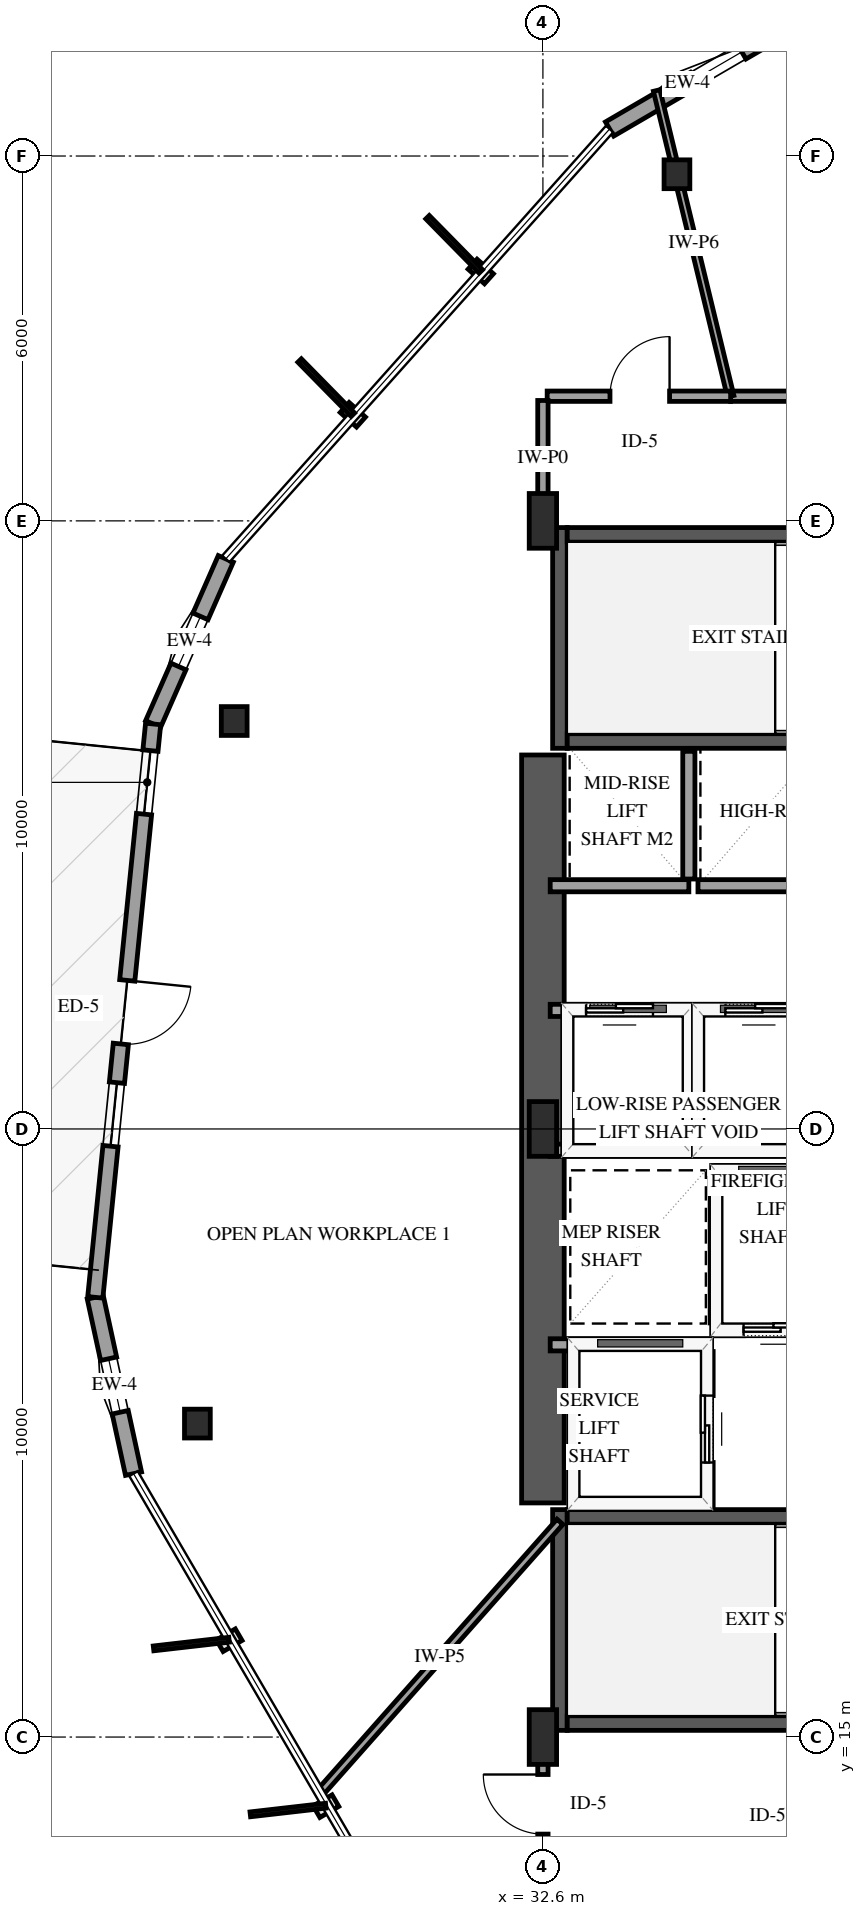
"""IFC4 building model, lengths in metres.
Left out: names, types, materials, properties, quantities, classifications, styles, units other than length and angle.
Written with IfcOpenShell. Run it as: python <this file> out.ifc"""

import sys

from ifc_helpers import new_model, si_unit, direction, frame, frame_2d, origin, origin_2d, place, context, subcontext, project, spatial, rectangle, i_section, extrude, element, fill, save


model = new_model("IFC4")
c1 = context("Model", 3, precision=1e-05, world=origin(), true_north=direction((0.0, 1.0)))
c2 = subcontext(c1, "Body", "Model", "MODEL_VIEW")
j1 = project(units=[si_unit("LENGTHUNIT", "METRE"), si_unit("PLANEANGLEUNIT", "RADIAN")], contexts=[c1])
p1 = place(None, origin())
s1 = spatial("IfcSite", under=j1, at=p1, CompositionType="ELEMENT")
p2 = place(p1, origin())
s2 = spatial("IfcBuilding", under=s1, at=p2, CompositionType="ELEMENT")
p3 = place(p2, frame((0.0, 0.0, 74.6)))
s3 = spatial("IfcBuildingStorey", under=s2, at=p3, CompositionType="ELEMENT", Elevation=74.6)
p4 = place(p3, frame((32.88, 15.11, 0.0), z_axis=(0.0, 0.0, 1.0), x_axis=(0.0, 1.0, 0.0)))
e1 = element("IfcWall", 1, at=p4, inside=s3, PredefinedType="SHEAR", context=c2, shape_type="SweptSolid", body=[
    extrude(rectangle(XDim=3.63, YDim=0.24, at=frame_2d((1.815, 0.0))), origin(), (0.0, 0.0, 1.0), 4.0),
])
for number, where, z_axis, x_axis in (
    (2, (33.0, 15.23, 0.0), (0.0, 0.0, 1.0), (1.0, 0.0, 0.0)),
    (3, (33.0, 18.62, 0.0), (0.0, 0.0, 1.0), (1.0, 0.0, 0.0)),
):
    element("IfcWall", number, at=place(p3, frame(where, z_axis=z_axis, x_axis=x_axis)), inside=s3, PredefinedType="SHEAR", context=c2, shape_type="SweptSolid", body=[
        extrude(rectangle(XDim=8.0, YDim=0.24, at=frame_2d((4.0, 0.0))), origin(), (0.0, 0.0, 1.0), 4.0),
    ])
p5 = place(p3, frame((32.88, 31.26, 0.0), z_axis=(0.0, 0.0, 1.0), x_axis=(0.0, 1.0, 0.0)))
e4 = element("IfcWall", 4, at=p5, inside=s3, PredefinedType="SHEAR", context=c2, shape_type="SweptSolid", body=[
    extrude(rectangle(XDim=3.63, YDim=0.24, at=frame_2d((1.815, 0.0))), origin(), (0.0, 0.0, 1.0), 4.0),
])
for number, where, z_axis, x_axis in (
    (5, (33.0, 31.38, 0.0), (0.0, 0.0, 1.0), (1.0, 0.0, 0.0)),
    (6, (33.0, 34.77, 0.0), (0.0, 0.0, 1.0), (1.0, 0.0, 0.0)),
):
    element("IfcWall", number, at=place(p3, frame(where, z_axis=z_axis, x_axis=x_axis)), inside=s3, PredefinedType="SHEAR", context=c2, shape_type="SweptSolid", body=[
        extrude(rectangle(XDim=8.0, YDim=0.24, at=frame_2d((4.0, 0.0))), origin(), (0.0, 0.0, 1.0), 4.0),
    ])
p6 = place(p3, frame((32.6, 18.85, 0.0), z_axis=(0.0, 0.0, 1.0), x_axis=(0.0, 1.0, 0.0)))
e7 = element("IfcWall", 7, at=p6, inside=s3, PredefinedType="SHEAR", context=c2, shape_type="SweptSolid", body=[
    extrude(rectangle(XDim=12.3, YDim=0.7, at=frame_2d((6.15, 0.0))), origin(), (0.0, 0.0, 1.0), 4.0),
])
for number, where, z_axis, x_axis in (
    (8, (32.6, 15.0, 0.0), (0.0, 0.0, 1.0), (1.0, 0.0, 0.0)),
    (9, (32.6, 25.0, 0.0), (0.0, 0.0, 1.0), (1.0, 0.0, 0.0)),
    (10, (32.6, 35.0, 0.0), (0.0, 0.0, 1.0), (1.0, 0.0, 0.0)),
):
    element("IfcColumn", number, at=place(p3, frame(where, z_axis=z_axis, x_axis=x_axis)), inside=s3, PredefinedType="PILASTER", context=c2, shape_type="SweptSolid", body=[
        extrude(rectangle(XDim=0.45, YDim=0.9, at=origin_2d()), origin(), (0.0, 0.0, 1.0), 4.0),
    ])
for number, where, z_axis, x_axis in (
    (11, (34.804, 40.7, 0.0), (0.0, 0.0, 1.0), (1.0, 0.0, 0.0)),
    (12, (27.523, 31.708, 0.0), (0.0, 0.0, 1.0), (1.0, 0.0, 0.0)),
    (13, (26.918, 20.155, 0.0), (0.0, 0.0, 1.0), (1.0, 0.0, 0.0)),
):
    element("IfcColumn", number, at=place(p3, frame(where, z_axis=z_axis, x_axis=x_axis)), inside=s3, PredefinedType="COLUMN", context=c2, shape_type="SweptSolid", body=[
        extrude(i_section(OverallWidth=0.424, OverallDepth=0.474, WebThickness=0.048, FlangeThickness=0.077, FilletRadius=0.038, at=origin_2d()), origin(), (0.0, 0.0, 1.0), 4.0),
    ])
p7 = place(p3, frame((36.26, 42.938, 0.0), z_axis=(0.0, 0.0, 1.0), x_axis=(-0.863895290782, -0.503671447041, 0.0)))
e14 = element("IfcWall", 14, at=p7, inside=s3, PredefinedType="SOLIDWALL", context=c2, shape_type="SweptSolid", body=[
    extrude(rectangle(XDim=2.967, YDim=0.27, at=frame_2d((1.483, 0.0))), origin(), (0.0, 0.0, 1.0), 3.079),
])
p8 = place(p7, frame((0.45, 0.0, 0.75)))
e15 = element("IfcOpeningElement", 15, at=p8, cuts=e14, PredefinedType="OPENING", context=c2, shape_type="SweptSolid", body=[
    extrude(rectangle(XDim=0.9, YDim=1.5, at=frame_2d((0.45, 0.75))), frame((0.0, 0.145, 0.0), z_axis=(0.0, -1.0, 0.0), x_axis=(1.0, 0.0, 0.0)), (0.0, 0.0, 1.0), 0.29),
])
p9 = place(p3, frame((27.385, 34.375, 0.0), z_axis=(0.0, 0.0, 1.0), x_axis=(-0.402859965055, -0.915261628473, 0.0)))
e16 = element("IfcWall", 16, at=p9, inside=s3, PredefinedType="SOLIDWALL", context=c2, shape_type="SweptSolid", body=[
    extrude(rectangle(XDim=2.967, YDim=0.27, at=frame_2d((1.483, 0.0))), origin(), (0.0, 0.0, 1.0), 3.079),
])
p10 = place(p9, frame((1.033, 0.0, 0.75)))
e17 = element("IfcOpeningElement", 17, at=p10, cuts=e16, PredefinedType="OPENING", context=c2, shape_type="SweptSolid", body=[
    extrude(rectangle(XDim=0.9, YDim=1.5, at=frame_2d((0.45, 0.75))), frame((0.0, 0.145, 0.0), z_axis=(0.0, -1.0, 0.0), x_axis=(1.0, 0.0, 0.0)), (0.0, 0.0, 1.0), 0.29),
])
p11 = place(p3, frame((25.239, 22.231, 0.0), z_axis=(0.0, 0.0, 1.0), x_axis=(0.212012761333, -0.977266897542, 0.0)))
e18 = element("IfcWall", 18, at=p11, inside=s3, PredefinedType="SOLIDWALL", context=c2, shape_type="SweptSolid", body=[
    extrude(rectangle(XDim=2.966, YDim=0.27, at=frame_2d((1.483, 0.0))), origin(), (0.0, 0.0, 1.0), 3.079),
])
p12 = place(p11, frame((1.033, 0.0, 0.75)))
e19 = element("IfcOpeningElement", 19, at=p12, cuts=e18, PredefinedType="OPENING", context=c2, shape_type="SweptSolid", body=[
    extrude(rectangle(XDim=0.9, YDim=1.5, at=frame_2d((0.45, 0.75))), frame((0.0, 0.145, 0.0), z_axis=(0.0, -1.0, 0.0), x_axis=(1.0, 0.0, 0.0)), (0.0, 0.0, 1.0), 0.29),
])
p13 = place(p3, frame((26.19, 31.66, 0.0), z_axis=(0.0, 0.0, 1.0), x_axis=(-0.100365790493, -0.994950605859, 0.0)))
e20 = element("IfcWall", 20, at=p13, inside=s3, PredefinedType="SOLIDWALL", context=c2, shape_type="SweptSolid", body=[
    extrude(rectangle(XDim=9.477, YDim=0.25, at=frame_2d((4.739, 0.0))), origin(), (0.0, 0.0, 1.0), 3.079),
])
p14 = place(p13, frame((4.239, 0.0, 0.0)))
e21 = element("IfcOpeningElement", 21, at=p14, cuts=e20, PredefinedType="OPENING", context=c2, shape_type="SweptSolid", body=[
    extrude(rectangle(XDim=1.05, YDim=2.15, at=frame_2d((0.525, 1.075))), frame((0.0, 0.135, 0.0), z_axis=(0.0, -1.0, 0.0), x_axis=(1.0, 0.0, 0.0)), (0.0, 0.0, 1.0), 0.27),
])
p15 = place(p13, frame((0.44, 0.0, 0.72)))
e22 = element("IfcOpeningElement", 22, at=p15, cuts=e20, PredefinedType="OPENING", context=c2, shape_type="SweptSolid", body=[
    extrude(rectangle(XDim=1.05, YDim=1.55, at=frame_2d((0.525, 0.775))), frame((0.0, 0.135, 0.0), z_axis=(0.0, -1.0, 0.0), x_axis=(1.0, 0.0, 0.0)), (0.0, 0.0, 1.0), 0.27),
])
p16 = place(p13, frame((5.928, 0.0, 0.72)))
e23 = element("IfcOpeningElement", 23, at=p16, cuts=e20, PredefinedType="OPENING", context=c2, shape_type="SweptSolid", body=[
    extrude(rectangle(XDim=1.05, YDim=1.55, at=frame_2d((0.525, 0.775))), frame((0.0, 0.135, 0.0), z_axis=(0.0, -1.0, 0.0), x_axis=(1.0, 0.0, 0.0)), (0.0, 0.0, 1.0), 0.27),
])
p17 = place(p3, frame((35.45, 21.7, 0.0), z_axis=(0.0, 0.0, 1.0), x_axis=(1.0, 0.0, 0.0)))
e24 = element("IfcWall", 24, at=p17, inside=s3, PredefinedType="SOLIDWALL", context=c2, shape_type="SweptSolid", body=[
    extrude(rectangle(XDim=2.0, YDim=0.2, at=frame_2d((1.0, 0.0))), origin(), (0.0, 0.0, 1.0), 3.7),
])
p18 = place(p17, frame((0.45, 0.0, 0.0)))
e25 = element("IfcOpeningElement", 25, at=p18, cuts=e24, PredefinedType="OPENING", context=c2, shape_type="SweptSolid", body=[
    extrude(rectangle(XDim=1.1, YDim=2.15, at=frame_2d((0.55, 1.075))), frame((0.0, 0.11, 0.0), z_axis=(0.0, -1.0, 0.0), x_axis=(1.0, 0.0, 0.0)), (0.0, 0.0, 1.0), 0.22),
])
p19 = place(p3, frame((35.45, 24.3, 0.0), z_axis=(0.0, 0.0, 1.0), x_axis=(1.0, 0.0, 0.0)))
e26 = element("IfcWall", 26, at=p19, inside=s3, PredefinedType="SOLIDWALL", context=c2, shape_type="SweptSolid", body=[
    extrude(rectangle(XDim=2.0, YDim=0.2, at=frame_2d((1.0, 0.0))), origin(), (0.0, 0.0, 1.0), 3.7),
])
p20 = place(p3, frame((35.45, 21.81, 0.0), z_axis=(0.0, 0.0, 1.0), x_axis=(0.0, 1.0, 0.0)))
e27 = element("IfcWall", 27, at=p20, inside=s3, PredefinedType="SOLIDWALL", context=c2, shape_type="SweptSolid", body=[
    extrude(rectangle(XDim=2.38, YDim=0.2, at=frame_2d((1.19, 0.0))), origin(), (0.0, 0.0, 1.0), 3.7),
])
p21 = place(p3, frame((32.72, 21.45, 0.0), z_axis=(0.0, 0.0, 1.0), x_axis=(1.0, 0.0, 0.0)))
e28 = element("IfcWall", 28, at=p21, inside=s3, PredefinedType="SOLIDWALL", context=c2, shape_type="SweptSolid", body=[
    extrude(rectangle(XDim=2.58, YDim=0.2, at=frame_2d((1.29, 0.0))), origin(), (0.0, 0.0, 1.0), 3.7),
])
p22 = place(p3, frame((35.3, 18.79, 0.0), z_axis=(0.0, 0.0, 1.0), x_axis=(0.0, 1.0, 0.0)))
e29 = element("IfcWall", 29, at=p22, inside=s3, PredefinedType="SOLIDWALL", context=c2, shape_type="SweptSolid", body=[
    extrude(rectangle(XDim=2.55, YDim=0.2, at=frame_2d((1.275, 0.0))), origin(), (0.0, 0.0, 1.0), 3.7),
])
p23 = place(p22, frame((0.725, 0.0, 0.0)))
e30 = element("IfcOpeningElement", 30, at=p23, cuts=e29, PredefinedType="OPENING", context=c2, shape_type="SweptSolid", body=[
    extrude(rectangle(XDim=1.1, YDim=2.15, at=frame_2d((0.55, 1.075))), frame((0.0, 0.11, 0.0), z_axis=(0.0, -1.0, 0.0), x_axis=(1.0, 0.0, 0.0)), (0.0, 0.0, 1.0), 0.22),
])
p24 = place(p3, frame((32.72, 24.65, 0.0), z_axis=(0.0, 0.0, 1.0), x_axis=(1.0, 0.0, 0.0)))
e31 = element("IfcWall", 31, at=p24, inside=s3, PredefinedType="SOLIDWALL", context=c2, shape_type="SweptSolid", body=[
    extrude(rectangle(XDim=2.28, YDim=0.2, at=frame_2d((1.14, 0.0))), origin(), (0.0, 0.0, 1.0), 3.7),
])
p25 = place(p3, frame((32.72, 26.95, 0.0), z_axis=(0.0, 0.0, 1.0), x_axis=(1.0, 0.0, 0.0)))
e32 = element("IfcWall", 32, at=p25, inside=s3, PredefinedType="SOLIDWALL", context=c2, shape_type="SweptSolid", body=[
    extrude(rectangle(XDim=2.28, YDim=0.2, at=frame_2d((1.14, 0.0))), origin(), (0.0, 0.0, 1.0), 3.7),
])
p26 = place(p25, frame((0.59, 0.0, 0.0)))
e33 = element("IfcOpeningElement", 33, at=p26, cuts=e32, PredefinedType="OPENING", context=c2, shape_type="SweptSolid", body=[
    extrude(rectangle(XDim=1.1, YDim=2.15, at=frame_2d((0.55, 1.075))), frame((0.0, 0.11, 0.0), z_axis=(0.0, -1.0, 0.0), x_axis=(1.0, 0.0, 0.0)), (0.0, 0.0, 1.0), 0.22),
])
p27 = place(p3, frame((35.0, 24.76, 0.0), z_axis=(0.0, 0.0, 1.0), x_axis=(0.0, 1.0, 0.0)))
e34 = element("IfcWall", 34, at=p27, inside=s3, PredefinedType="SOLIDWALL", context=c2, shape_type="SweptSolid", body=[
    extrude(rectangle(XDim=2.08, YDim=0.2, at=frame_2d((1.04, 0.0))), origin(), (0.0, 0.0, 1.0), 3.7),
])
p28 = place(p3, frame((35.15, 24.65, 0.0), z_axis=(0.0, 0.0, 1.0), x_axis=(1.0, 0.0, 0.0)))
e35 = element("IfcWall", 35, at=p28, inside=s3, PredefinedType="SOLIDWALL", context=c2, shape_type="SweptSolid", body=[
    extrude(rectangle(XDim=2.0, YDim=0.2, at=frame_2d((1.0, 0.0))), origin(), (0.0, 0.0, 1.0), 3.7),
])
p29 = place(p3, frame((35.15, 26.95, 0.0), z_axis=(0.0, 0.0, 1.0), x_axis=(1.0, 0.0, 0.0)))
e36 = element("IfcWall", 36, at=p29, inside=s3, PredefinedType="SOLIDWALL", context=c2, shape_type="SweptSolid", body=[
    extrude(rectangle(XDim=2.0, YDim=0.2, at=frame_2d((1.0, 0.0))), origin(), (0.0, 0.0, 1.0), 3.7),
])
p30 = place(p29, frame((0.45, 0.0, 0.0)))
e37 = element("IfcOpeningElement", 37, at=p30, cuts=e36, PredefinedType="OPENING", context=c2, shape_type="SweptSolid", body=[
    extrude(rectangle(XDim=1.1, YDim=2.15, at=frame_2d((0.55, 1.075))), frame((0.0, 0.11, 0.0), z_axis=(0.0, -1.0, 0.0), x_axis=(1.0, 0.0, 0.0)), (0.0, 0.0, 1.0), 0.22),
])
p31 = place(p3, frame((32.72, 29.0, 0.0), z_axis=(0.0, 0.0, 1.0), x_axis=(1.0, 0.0, 0.0)))
e38 = element("IfcWall", 38, at=p31, inside=s3, PredefinedType="SOLIDWALL", context=c2, shape_type="SweptSolid", body=[
    extrude(rectangle(XDim=2.28, YDim=0.2, at=frame_2d((1.14, 0.0))), origin(), (0.0, 0.0, 1.0), 3.7),
])
p32 = place(p3, frame((35.0, 29.11, 0.0), z_axis=(0.0, 0.0, 1.0), x_axis=(0.0, 1.0, 0.0)))
e39 = element("IfcWall", 39, at=p32, inside=s3, PredefinedType="SOLIDWALL", context=c2, shape_type="SweptSolid", body=[
    extrude(rectangle(XDim=2.1, YDim=0.2, at=frame_2d((1.05, 0.0))), origin(), (0.0, 0.0, 1.0), 3.7),
])
p33 = place(p3, frame((35.15, 29.0, 0.0), z_axis=(0.0, 0.0, 1.0), x_axis=(1.0, 0.0, 0.0)))
e40 = element("IfcWall", 40, at=p33, inside=s3, PredefinedType="SOLIDWALL", context=c2, shape_type="SweptSolid", body=[
    extrude(rectangle(XDim=2.0, YDim=0.2, at=frame_2d((1.0, 0.0))), origin(), (0.0, 0.0, 1.0), 3.7),
])
p34 = place(p3, frame((35.687, 37.05, 0.0), z_axis=(0.0, 0.0, 1.0), x_axis=(1.0, 0.0, 0.0)))
e41 = element("IfcWall", 41, at=p34, inside=s3, PredefinedType="PARTITIONING", context=c2, shape_type="SweptSolid", body=[
    extrude(rectangle(XDim=7.67, YDim=0.17, at=frame_2d((3.835, 0.0))), origin(), (0.0, 0.0, 1.0), 3.7),
])
p35 = place(p34, frame((3.36, 0.0, 0.0)))
e42 = element("IfcOpeningElement", 42, at=p35, cuts=e41, PredefinedType="OPENING", context=c2, shape_type="SweptSolid", body=[
    extrude(rectangle(XDim=0.98, YDim=2.15, at=frame_2d((0.49, 1.075))), frame((0.0, 0.095, 0.0), z_axis=(0.0, -1.0, 0.0), x_axis=(1.0, 0.0, 0.0)), (0.0, 0.0, 1.0), 0.19),
])
p36 = place(p3, frame((32.88, 18.54, 0.0), z_axis=(0.0, 0.0, 1.0), x_axis=(-0.663098879781, -0.748531813374, 0.0)))
e43 = element("IfcWall", 43, at=p36, inside=s3, PredefinedType="PARTITIONING", context=c2, shape_type="SweptSolid", body=[
    extrude(rectangle(XDim=5.958, YDim=0.13, at=frame_2d((2.979, 0.0))), origin(), (0.0, 0.0, 1.0), 3.7),
])
p37 = place(p3, frame((35.687, 37.05, 0.0), z_axis=(0.0, 0.0, 1.0), x_axis=(-0.235131176425, 0.971963646374, 0.0)))
e44 = element("IfcWall", 44, at=p37, inside=s3, PredefinedType="PARTITIONING", context=c2, shape_type="SweptSolid", body=[
    extrude(rectangle(XDim=5.172, YDim=0.11, at=frame_2d((2.586, 0.0))), origin(), (0.0, 0.0, 1.0), 2.995),
])
p38 = place(p3, frame((32.67, 37.05, 0.0), z_axis=(0.0, 0.0, 1.0), x_axis=(1.0, 0.0, 0.0)))
e45 = element("IfcWall", 45, at=p38, inside=s3, PredefinedType="PARTITIONING", context=c2, shape_type="SweptSolid", body=[
    extrude(rectangle(XDim=3.017, YDim=0.17, at=frame_2d((1.509, 0.0))), origin(), (0.0, 0.0, 1.0), 3.7),
])
p39 = place(p38, frame((1.033, 0.0, 0.0)))
e46 = element("IfcOpeningElement", 46, at=p39, cuts=e45, PredefinedType="OPENING", context=c2, shape_type="SweptSolid", body=[
    extrude(rectangle(XDim=0.98, YDim=2.15, at=frame_2d((0.49, 1.075))), frame((0.0, 0.095, 0.0), z_axis=(0.0, -1.0, 0.0), x_axis=(1.0, 0.0, 0.0)), (0.0, 0.0, 1.0), 0.19),
])
p40 = place(p3, frame((32.6, 13.02, 0.0), z_axis=(0.0, 0.0, 1.0), x_axis=(0.0, 1.0, 0.0)))
e47 = element("IfcWall", 47, at=p40, inside=s3, PredefinedType="PARTITIONING", context=c2, shape_type="SweptSolid", body=[
    extrude(rectangle(XDim=1.91, YDim=0.17, at=frame_2d((0.955, 0.0))), origin(), (0.0, 0.0, 1.0), 3.7),
])
p41 = place(p40, frame((0.384, 0.0, 0.0)))
e48 = element("IfcOpeningElement", 48, at=p41, cuts=e47, PredefinedType="OPENING", context=c2, shape_type="SweptSolid", body=[
    extrude(rectangle(XDim=0.98, YDim=2.15, at=frame_2d((0.49, 1.075))), frame((0.0, 0.095, 0.0), z_axis=(0.0, -1.0, 0.0), x_axis=(1.0, 0.0, 0.0)), (0.0, 0.0, 1.0), 0.19),
])
p42 = place(p3, frame((32.6, 35.07, 0.0), z_axis=(0.0, 0.0, 1.0), x_axis=(0.0, 1.0, 0.0)))
e49 = element("IfcWall", 49, at=p42, inside=s3, PredefinedType="PARTITIONING", context=c2, shape_type="SweptSolid", body=[
    extrude(rectangle(XDim=1.91, YDim=0.17, at=frame_2d((0.955, 0.0))), origin(), (0.0, 0.0, 1.0), 3.7),
])
p43 = place(p8, origin())
e50 = element("IfcWindow", 50, at=p43, inside=s3, PartitioningType="SINGLE_PANEL", PredefinedType="WINDOW", context=c2, shape_type="SweptSolid", body=[
    extrude(rectangle(XDim=0.9, YDim=1.5, at=frame_2d((0.45, 0.75))), frame((0.0, 0.03, 0.0), z_axis=(0.0, -1.0, 0.0), x_axis=(1.0, 0.0, 0.0)), (0.0, 0.0, 1.0), 0.06),
])
fill(e15, e50)
p44 = place(p10, origin())
e51 = element("IfcWindow", 51, at=p44, inside=s3, PartitioningType="SINGLE_PANEL", PredefinedType="WINDOW", context=c2, shape_type="SweptSolid", body=[
    extrude(rectangle(XDim=0.9, YDim=1.5, at=frame_2d((0.45, 0.75))), frame((0.0, 0.03, 0.0), z_axis=(0.0, -1.0, 0.0), x_axis=(1.0, 0.0, 0.0)), (0.0, 0.0, 1.0), 0.06),
])
fill(e17, e51)
p45 = place(p12, origin())
e52 = element("IfcWindow", 52, at=p45, inside=s3, PartitioningType="SINGLE_PANEL", PredefinedType="WINDOW", context=c2, shape_type="SweptSolid", body=[
    extrude(rectangle(XDim=0.9, YDim=1.5, at=frame_2d((0.45, 0.75))), frame((0.0, 0.03, 0.0), z_axis=(0.0, -1.0, 0.0), x_axis=(1.0, 0.0, 0.0)), (0.0, 0.0, 1.0), 0.06),
])
fill(e19, e52)
p46 = place(p14, origin())
e53 = element("IfcDoor", 53, at=p46, inside=s3, OperationType="SINGLE_SWING_LEFT", PredefinedType="DOOR", context=c2, shape_type="SweptSolid", body=[
    extrude(rectangle(XDim=1.05, YDim=2.15, at=frame_2d((0.525, 1.075))), frame((0.0, 0.025, 0.0), z_axis=(0.0, -1.0, 0.0), x_axis=(1.0, 0.0, 0.0)), (0.0, 0.0, 1.0), 0.05),
])
fill(e21, e53)
p47 = place(p15, origin())
e54 = element("IfcWindow", 54, at=p47, inside=s3, PartitioningType="SINGLE_PANEL", PredefinedType="WINDOW", context=c2, shape_type="SweptSolid", body=[
    extrude(rectangle(XDim=1.05, YDim=1.55, at=frame_2d((0.525, 0.775))), frame((0.0, 0.03, 0.0), z_axis=(0.0, -1.0, 0.0), x_axis=(1.0, 0.0, 0.0)), (0.0, 0.0, 1.0), 0.06),
])
fill(e22, e54)
p48 = place(p16, origin())
e55 = element("IfcWindow", 55, at=p48, inside=s3, PartitioningType="SINGLE_PANEL", PredefinedType="WINDOW", context=c2, shape_type="SweptSolid", body=[
    extrude(rectangle(XDim=1.05, YDim=1.55, at=frame_2d((0.525, 0.775))), frame((0.0, 0.03, 0.0), z_axis=(0.0, -1.0, 0.0), x_axis=(1.0, 0.0, 0.0)), (0.0, 0.0, 1.0), 0.06),
])
fill(e23, e55)
p49 = place(p18, origin())
e56 = element("IfcDoor", 56, at=p49, inside=s3, OperationType="SLIDING_TO_LEFT", PredefinedType="DOOR", context=c2, shape_type="SweptSolid", body=[
    extrude(rectangle(XDim=1.1, YDim=2.15, at=frame_2d((0.55, 1.075))), frame((0.0, 0.025, 0.0), z_axis=(0.0, -1.0, 0.0), x_axis=(1.0, 0.0, 0.0)), (0.0, 0.0, 1.0), 0.05),
])
fill(e25, e56)
p50 = place(p23, origin())
e57 = element("IfcDoor", 57, at=p50, inside=s3, OperationType="SLIDING_TO_LEFT", PredefinedType="DOOR", context=c2, shape_type="SweptSolid", body=[
    extrude(rectangle(XDim=1.1, YDim=2.15, at=frame_2d((0.55, 1.075))), frame((0.0, 0.025, 0.0), z_axis=(0.0, -1.0, 0.0), x_axis=(1.0, 0.0, 0.0)), (0.0, 0.0, 1.0), 0.05),
])
fill(e30, e57)
p51 = place(p26, origin())
e58 = element("IfcDoor", 58, at=p51, inside=s3, OperationType="SLIDING_TO_LEFT", PredefinedType="DOOR", context=c2, shape_type="SweptSolid", body=[
    extrude(rectangle(XDim=1.1, YDim=2.15, at=frame_2d((0.55, 1.075))), frame((0.0, 0.025, 0.0), z_axis=(0.0, -1.0, 0.0), x_axis=(1.0, 0.0, 0.0)), (0.0, 0.0, 1.0), 0.05),
])
fill(e33, e58)
p52 = place(p30, origin())
e59 = element("IfcDoor", 59, at=p52, inside=s3, OperationType="SLIDING_TO_LEFT", PredefinedType="DOOR", context=c2, shape_type="SweptSolid", body=[
    extrude(rectangle(XDim=1.1, YDim=2.15, at=frame_2d((0.55, 1.075))), frame((0.0, 0.025, 0.0), z_axis=(0.0, -1.0, 0.0), x_axis=(1.0, 0.0, 0.0)), (0.0, 0.0, 1.0), 0.05),
])
fill(e37, e59)
p53 = place(p39, origin())
e60 = element("IfcDoor", 60, at=p53, inside=s3, OperationType="SINGLE_SWING_RIGHT", PredefinedType="DOOR", context=c2, shape_type="SweptSolid", body=[
    extrude(rectangle(XDim=0.98, YDim=2.15, at=frame_2d((0.49, 1.075))), frame((0.0, 0.025, 0.0), z_axis=(0.0, -1.0, 0.0), x_axis=(1.0, 0.0, 0.0)), (0.0, 0.0, 1.0), 0.05),
])
fill(e46, e60)
p54 = place(p41, origin())
e61 = element("IfcDoor", 61, at=p54, inside=s3, OperationType="SINGLE_SWING_RIGHT", PredefinedType="DOOR", context=c2, shape_type="SweptSolid", body=[
    extrude(rectangle(XDim=0.98, YDim=2.15, at=frame_2d((0.49, 1.075))), frame((0.0, 0.025, 0.0), z_axis=(0.0, -1.0, 0.0), x_axis=(1.0, 0.0, 0.0)), (0.0, 0.0, 1.0), 0.05),
])
fill(e48, e61)
save(model, sys.argv[1])
